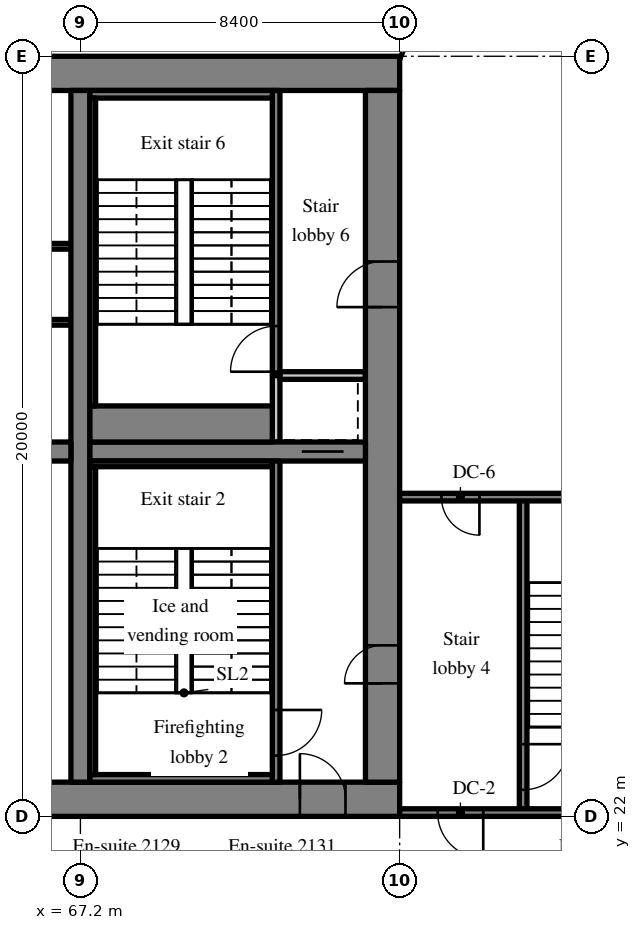
"""IFC4 building model, lengths in metres.
Left out: names, types, materials, properties, quantities, classifications, styles, units other than length and angle.
Written with IfcOpenShell. Run it as: python <this file> out.ifc"""

import sys

from ifc_helpers import new_model, si_unit, direction, frame, frame_2d, origin, place, context, subcontext, project, spatial, rectangle, extrude, source, transform, mapped, element, fill, save


model = new_model("IFC4")
c1 = context("Model", 3, precision=1e-05, world=origin(), true_north=direction((0.0, 1.0)))
c2 = subcontext(c1, "Body", "Model", "MODEL_VIEW")
j1 = project(units=[si_unit("LENGTHUNIT", "METRE"), si_unit("PLANEANGLEUNIT", "RADIAN")], contexts=[c1])
p1 = place(None, origin())
s1 = spatial("IfcSite", under=j1, at=p1, CompositionType="ELEMENT")
p2 = place(p1, origin())
s2 = spatial("IfcBuilding", under=s1, at=p2, CompositionType="ELEMENT")
p3 = place(p2, frame((0.0, 0.0, 91.4)))
s3 = spatial("IfcBuildingStorey", under=s2, at=p3, CompositionType="ELEMENT", Elevation=91.4)
m1 = source(origin(), c2, "Body", "SweptSolid", [
    extrude(rectangle(XDim=50.4, YDim=0.9, at=frame_2d((25.2, 0.0))), origin(), (0.0, 0.0, 1.0), 3.52),
])
p4 = place(p3, frame((25.2, 22.45, 0.0), z_axis=(0.0, 0.0, 1.0), x_axis=(1.0, 0.0, 0.0)))
e1 = element("IfcWall", 1, at=p4, inside=s3, PredefinedType="SHEAR", context=c2, shape_type="MappedRepresentation", body=[
    mapped(m1, transform((0.0, 0.0, 0.0), scale=1.0)),
])
m2 = source(origin(), c2, "Body", "SweptSolid", [
    extrude(rectangle(XDim=1.8, YDim=2.1, at=frame_2d((0.9, 1.05))), frame((0.0, 0.46, 0.0), z_axis=(0.0, -1.0, 0.0), x_axis=(1.0, 0.0, 0.0)), (0.0, 0.0, 1.0), 0.92),
])
p5 = place(p4, frame((15.9, 0.0, 0.0)))
e2 = element("IfcOpeningElement", 2, at=p5, cuts=e1, PredefinedType="OPENING", context=c2, shape_type="MappedRepresentation", body=[
    mapped(m2, transform((0.0, 0.0, 0.0), scale=1.0)),
])
m3 = source(origin(), c2, "Body", "SweptSolid", [
    extrude(rectangle(XDim=1.2, YDim=2.1, at=frame_2d((0.6, 1.05))), frame((0.0, 0.46, 0.0), z_axis=(0.0, -1.0, 0.0), x_axis=(1.0, 0.0, 0.0)), (0.0, 0.0, 1.0), 0.92),
])
p6 = place(p4, frame((26.975, 0.0, 0.0)))
e3 = element("IfcOpeningElement", 3, at=p6, cuts=e1, PredefinedType="OPENING", context=c2, shape_type="MappedRepresentation", body=[
    mapped(m3, transform((0.0, 0.0, 0.0), scale=1.0)),
])
m4 = source(origin(), c2, "Body", "SweptSolid", [
    extrude(rectangle(XDim=0.9, YDim=2.1, at=frame_2d((0.45, 1.05))), frame((0.0, 0.46, 0.0), z_axis=(0.0, -1.0, 0.0), x_axis=(1.0, 0.0, 0.0)), (0.0, 0.0, 1.0), 0.92),
])
p7 = place(p4, frame((34.5, 0.0, 0.0)))
e4 = element("IfcOpeningElement", 4, at=p7, cuts=e1, PredefinedType="OPENING", context=c2, shape_type="MappedRepresentation", body=[
    mapped(m4, transform((0.0, 0.0, 0.0), scale=1.0)),
])
p8 = place(p4, frame((31.5, 0.0, 0.0)))
e5 = element("IfcOpeningElement", 5, at=p8, cuts=e1, PredefinedType="OPENING", context=c2, shape_type="MappedRepresentation", body=[
    mapped(m4, transform((0.0, 0.0, 0.0), scale=1.0)),
])
p9 = place(p4, frame((39.788, 0.0, 0.0)))
e6 = element("IfcOpeningElement", 6, at=p9, cuts=e1, PredefinedType="OPENING", context=c2, shape_type="MappedRepresentation", body=[
    mapped(m4, transform((0.0, 0.0, 0.0), scale=1.0)),
])
p10 = place(p4, frame((36.762, 0.0, 0.0)))
e7 = element("IfcOpeningElement", 7, at=p10, cuts=e1, PredefinedType="OPENING", context=c2, shape_type="MappedRepresentation", body=[
    mapped(m4, transform((0.0, 0.0, 0.0), scale=1.0)),
])
p11 = place(p4, frame((6.45, 0.0, 0.0)))
e8 = element("IfcOpeningElement", 8, at=p11, cuts=e1, PredefinedType="OPENING", context=c2, shape_type="MappedRepresentation", body=[
    mapped(m3, transform((0.0, 0.0, 0.0), scale=1.0)),
])
p12 = place(p4, frame((47.775, 0.0, 0.0)))
e9 = element("IfcOpeningElement", 9, at=p12, cuts=e1, PredefinedType="OPENING", context=c2, shape_type="MappedRepresentation", body=[
    mapped(m3, transform((0.0, 0.0, 0.0), scale=1.0)),
])
p13 = place(p3, frame((25.2, 41.55, 0.0), z_axis=(0.0, 0.0, 1.0), x_axis=(1.0, 0.0, 0.0)))
e10 = element("IfcWall", 10, at=p13, inside=s3, PredefinedType="SHEAR", context=c2, shape_type="MappedRepresentation", body=[
    mapped(m1, transform((0.0, 0.0, 0.0), scale=1.0)),
])
m5 = source(origin(), c2, "Body", "SweptSolid", [
    extrude(rectangle(XDim=18.2, YDim=0.9, at=frame_2d((9.1, 0.0))), origin(), (0.0, 0.0, 1.0), 3.52),
])
p14 = place(p3, frame((75.15, 22.9, 0.0), z_axis=(0.0, 0.0, 1.0), x_axis=(0.0, 1.0, 0.0)))
e11 = element("IfcWall", 11, at=p14, inside=s3, PredefinedType="SHEAR", context=c2, shape_type="MappedRepresentation", body=[
    mapped(m5, transform((0.0, 0.0, 0.0), scale=1.0)),
])
m6 = source(origin(), c2, "Body", "SweptSolid", [
    extrude(rectangle(XDim=1.0, YDim=2.1, at=frame_2d((0.5, 1.05))), frame((0.0, 0.46, 0.0), z_axis=(0.0, -1.0, 0.0), x_axis=(1.0, 0.0, 0.0)), (0.0, 0.0, 1.0), 0.92),
])
p15 = place(p14, frame((2.6, 0.0, 0.0)))
e12 = element("IfcOpeningElement", 12, at=p15, cuts=e11, PredefinedType="OPENING", context=c2, shape_type="MappedRepresentation", body=[
    mapped(m6, transform((0.0, 0.0, 0.0), scale=1.0)),
])
p16 = place(p14, frame((12.5, 0.0, 0.0)))
e13 = element("IfcOpeningElement", 13, at=p16, cuts=e11, PredefinedType="OPENING", context=c2, shape_type="MappedRepresentation", body=[
    mapped(m3, transform((0.0, 0.0, 0.0), scale=1.0)),
])
m7 = source(origin(), c2, "Body", "SweptSolid", [
    extrude(rectangle(XDim=18.2, YDim=0.5, at=frame_2d((9.1, 0.0))), origin(), (0.0, 0.0, 1.0), 3.52),
])
p17 = place(p3, frame((67.2, 22.9, 0.0), z_axis=(0.0, 0.0, 1.0), x_axis=(0.0, 1.0, 0.0)))
e14 = element("IfcWall", 14, at=p17, inside=s3, PredefinedType="SHEAR", context=c2, shape_type="MappedRepresentation", body=[
    mapped(m7, transform((0.0, 0.0, 0.0), scale=1.0)),
])
m8 = source(origin(), c2, "Body", "SweptSolid", [
    extrude(rectangle(XDim=16.3, YDim=0.5, at=frame_2d((8.15, 0.0))), origin(), (0.0, 0.0, 1.0), 3.52),
])
p18 = place(p3, frame((50.65, 31.6, 0.0), z_axis=(0.0, 0.0, 1.0), x_axis=(1.0, 0.0, 0.0)))
e15 = element("IfcWall", 15, at=p18, inside=s3, PredefinedType="SHEAR", context=c2, shape_type="MappedRepresentation", body=[
    mapped(m8, transform((0.0, 0.0, 0.0), scale=1.0)),
])
m9 = source(origin(), c2, "Body", "SweptSolid", [
    extrude(rectangle(XDim=1.0, YDim=2.1, at=frame_2d((0.5, 1.05))), frame((0.0, 0.26, 0.0), z_axis=(0.0, -1.0, 0.0), x_axis=(1.0, 0.0, 0.0)), (0.0, 0.0, 1.0), 0.52),
])
p19 = place(p18, frame((0.575, 0.0, 0.0)))
e16 = element("IfcOpeningElement", 16, at=p19, cuts=e15, PredefinedType="OPENING", context=c2, shape_type="MappedRepresentation", body=[
    mapped(m9, transform((0.0, 0.0, 0.0), scale=1.0)),
])
m10 = source(origin(), c2, "Body", "SweptSolid", [
    extrude(rectangle(XDim=7.25, YDim=0.5, at=frame_2d((3.625, 0.0))), origin(), (0.0, 0.0, 1.0), 3.52),
])
p20 = place(p3, frame((67.45, 31.6, 0.0), z_axis=(0.0, 0.0, 1.0), x_axis=(1.0, 0.0, 0.0)))
e17 = element("IfcWall", 17, at=p20, inside=s3, PredefinedType="SHEAR", context=c2, shape_type="MappedRepresentation", body=[
    mapped(m10, transform((0.0, 0.0, 0.0), scale=1.0)),
])
m11 = source(origin(), c2, "Body", "SweptSolid", [
    extrude(rectangle(XDim=1.1, YDim=2.1, at=frame_2d((0.55, 1.05))), frame((0.0, 0.26, 0.0), z_axis=(0.0, -1.0, 0.0), x_axis=(1.0, 0.0, 0.0)), (0.0, 0.0, 1.0), 0.52),
])
p21 = place(p20, frame((5.575, 0.0, 0.0)))
e18 = element("IfcOpeningElement", 18, at=p21, cuts=e17, PredefinedType="OPENING", context=c2, shape_type="MappedRepresentation", body=[
    mapped(m11, transform((0.0, 0.0, 0.0), scale=1.0)),
])
m12 = source(origin(), c2, "Body", "SweptSolid", [
    extrude(rectangle(XDim=14.15, YDim=0.15, at=frame_2d((7.075, 0.0))), origin(), (0.0, 0.0, 1.0), 3.52),
])
p22 = place(p3, frame((66.95, 35.0, 0.0), z_axis=(0.0, 0.0, 1.0), x_axis=(-1.0, 0.0, 0.0)))
e19 = element("IfcWall", 19, at=p22, inside=s3, PredefinedType="PARTITIONING", context=c2, shape_type="MappedRepresentation", body=[
    mapped(m12, transform((0.0, 0.0, 0.0), scale=1.0)),
])
m13 = source(origin(), c2, "Body", "SweptSolid", [
    extrude(rectangle(XDim=0.9, YDim=2.1, at=frame_2d((0.45, 1.05))), frame((0.0, 0.085, 0.0), z_axis=(0.0, -1.0, 0.0), x_axis=(1.0, 0.0, 0.0)), (0.0, 0.0, 1.0), 0.17),
])
p23 = place(p22, frame((0.958, 0.0, 0.0)))
e20 = element("IfcOpeningElement", 20, at=p23, cuts=e19, PredefinedType="OPENING", context=c2, shape_type="MappedRepresentation", body=[
    mapped(m13, transform((0.0, 0.0, 0.0), scale=1.0)),
])
p24 = place(p22, frame((5.884, 0.0, 0.0)))
e21 = element("IfcOpeningElement", 21, at=p24, cuts=e19, PredefinedType="OPENING", context=c2, shape_type="MappedRepresentation", body=[
    mapped(m13, transform((0.0, 0.0, 0.0), scale=1.0)),
])
p25 = place(p22, frame((11.514, 0.0, 0.0)))
e22 = element("IfcOpeningElement", 22, at=p25, cuts=e19, PredefinedType="OPENING", context=c2, shape_type="MappedRepresentation", body=[
    mapped(m13, transform((0.0, 0.0, 0.0), scale=1.0)),
])
m14 = source(origin(), c2, "Body", "SweptSolid", [
    extrude(rectangle(XDim=16.3, YDim=0.15, at=frame_2d((8.15, 0.0))), origin(), (0.0, 0.0, 1.0), 3.52),
])
p26 = place(p3, frame((66.95, 37.0, 0.0), z_axis=(0.0, 0.0, 1.0), x_axis=(-1.0, 0.0, 0.0)))
e23 = element("IfcWall", 23, at=p26, inside=s3, PredefinedType="PARTITIONING", context=c2, shape_type="MappedRepresentation", body=[
    mapped(m14, transform((0.0, 0.0, 0.0), scale=1.0)),
])
p27 = place(p26, frame((0.773, 0.0, 0.0)))
e24 = element("IfcOpeningElement", 24, at=p27, cuts=e23, PredefinedType="OPENING", context=c2, shape_type="MappedRepresentation", body=[
    mapped(m13, transform((0.0, 0.0, 0.0), scale=1.0)),
])
p28 = place(p26, frame((3.625, 0.0, 0.0)))
e25 = element("IfcOpeningElement", 25, at=p28, cuts=e23, PredefinedType="OPENING", context=c2, shape_type="MappedRepresentation", body=[
    mapped(m13, transform((0.0, 0.0, 0.0), scale=1.0)),
])
p29 = place(p26, frame((9.33, 0.0, 0.0)))
e26 = element("IfcOpeningElement", 26, at=p29, cuts=e23, PredefinedType="OPENING", context=c2, shape_type="MappedRepresentation", body=[
    mapped(m13, transform((0.0, 0.0, 0.0), scale=1.0)),
])
p30 = place(p26, frame((14.627, 0.0, 0.0)))
e27 = element("IfcOpeningElement", 27, at=p30, cuts=e23, PredefinedType="OPENING", context=c2, shape_type="MappedRepresentation", body=[
    mapped(m13, transform((0.0, 0.0, 0.0), scale=1.0)),
])
m15 = source(origin(), c2, "Body", "SweptSolid", [
    extrude(rectangle(XDim=8.45, YDim=0.2, at=frame_2d((4.225, 0.0))), origin(), (0.0, 0.0, 1.0), 3.52),
])
p31 = place(p3, frame((72.35, 22.9, 0.0), z_axis=(0.0, 0.0, 1.0), x_axis=(0.0, 1.0, 0.0)))
e28 = element("IfcWall", 28, at=p31, inside=s3, PredefinedType="SOLIDWALL", context=c2, shape_type="MappedRepresentation", body=[
    mapped(m15, transform((0.0, 0.0, 0.0), scale=1.0)),
])
m16 = source(origin(), c2, "Body", "SweptSolid", [
    extrude(rectangle(XDim=1.2, YDim=2.1, at=frame_2d((0.6, 1.05))), frame((0.0, 0.11, 0.0), z_axis=(0.0, -1.0, 0.0), x_axis=(1.0, 0.0, 0.0)), (0.0, 0.0, 1.0), 0.22),
])
p32 = place(p31, frame((0.7, 0.0, 0.0)))
e29 = element("IfcOpeningElement", 29, at=p32, cuts=e28, PredefinedType="OPENING", context=c2, shape_type="MappedRepresentation", body=[
    mapped(m16, transform((0.0, 0.0, 0.0), scale=1.0)),
])
m17 = source(origin(), c2, "Body", "SweptSolid", [
    extrude(rectangle(XDim=1.75, YDim=0.2, at=frame_2d((0.875, 0.0))), origin(), (0.0, 0.0, 1.0), 3.52),
])
p33 = place(p3, frame((72.35, 31.85, 0.0), z_axis=(0.0, 0.0, 1.0), x_axis=(0.0, 1.0, 0.0)))
e30 = element("IfcWall", 30, at=p33, inside=s3, PredefinedType="SOLIDWALL", context=c2, shape_type="MappedRepresentation", body=[
    mapped(m17, transform((0.0, 0.0, 0.0), scale=1.0)),
])
m18 = source(origin(), c2, "Body", "SweptSolid", [
    extrude(rectangle(XDim=2.25, YDim=0.2, at=frame_2d((1.125, 0.0))), origin(), (0.0, 0.0, 1.0), 3.52),
])
p34 = place(p3, frame((72.45, 33.6, 0.0), z_axis=(0.0, 0.0, 1.0), x_axis=(1.0, 0.0, 0.0)))
e31 = element("IfcWall", 31, at=p34, inside=s3, PredefinedType="SOLIDWALL", context=c2, shape_type="MappedRepresentation", body=[
    mapped(m18, transform((0.0, 0.0, 0.0), scale=1.0)),
])
m19 = source(origin(), c2, "Body", "SweptSolid", [
    extrude(rectangle(XDim=7.5, YDim=0.2, at=frame_2d((3.75, 0.0))), origin(), (0.0, 0.0, 1.0), 3.52),
])
p35 = place(p3, frame((72.35, 33.6, 0.0), z_axis=(0.0, 0.0, 1.0), x_axis=(0.0, 1.0, 0.0)))
e32 = element("IfcWall", 32, at=p35, inside=s3, PredefinedType="SOLIDWALL", context=c2, shape_type="MappedRepresentation", body=[
    mapped(m19, transform((0.0, 0.0, 0.0), scale=1.0)),
])
p36 = place(p35, frame((0.1, 0.0, 0.0)))
e33 = element("IfcOpeningElement", 33, at=p36, cuts=e32, PredefinedType="OPENING", context=c2, shape_type="MappedRepresentation", body=[
    mapped(m16, transform((0.0, 0.0, 0.0), scale=1.0)),
])
m20 = source(origin(), c2, "Body", "SweptSolid", [
    extrude(rectangle(XDim=8.3, YDim=0.2, at=frame_2d((4.15, 0.0))), origin(), (0.0, 0.0, 1.0), 3.52),
])
p37 = place(p3, frame((78.85, 22.1, 0.0), z_axis=(0.0, 0.0, 1.0), x_axis=(0.0, 1.0, 0.0)))
e34 = element("IfcWall", 34, at=p37, inside=s3, PredefinedType="SOLIDWALL", context=c2, shape_type="MappedRepresentation", body=[
    mapped(m20, transform((0.0, 0.0, 0.0), scale=1.0)),
])
p38 = place(p37, frame((0.6, 0.0, 0.0)))
e35 = element("IfcOpeningElement", 35, at=p38, cuts=e34, PredefinedType="OPENING", context=c2, shape_type="MappedRepresentation", body=[
    mapped(m16, transform((0.0, 0.0, 0.0), scale=1.0)),
])
m21 = source(origin(), c2, "Body", "SweptSolid", [
    extrude(rectangle(XDim=8.225, YDim=0.2, at=frame_2d((4.112, 0.0))), origin(), (0.0, 0.0, 1.0), 3.52),
])
p39 = place(p3, frame((83.825, 22.1, 0.0), z_axis=(0.0, 0.0, 1.0), x_axis=(-1.0, 0.0, 0.0)))
e36 = element("IfcWall", 36, at=p39, inside=s3, PredefinedType="SOLIDWALL", context=c2, shape_type="MappedRepresentation", body=[
    mapped(m21, transform((0.0, 0.0, 0.0), scale=1.0)),
])
p40 = place(p39, frame((6.025, 0.0, 0.0)))
e37 = element("IfcOpeningElement", 37, at=p40, cuts=e36, PredefinedType="OPENING", context=c2, shape_type="MappedRepresentation", body=[
    mapped(m16, transform((0.0, 0.0, 0.0), scale=1.0)),
])
p41 = place(p3, frame((83.825, 30.4, 0.0), z_axis=(0.0, 0.0, 1.0), x_axis=(-1.0, 0.0, 0.0)))
e38 = element("IfcWall", 38, at=p41, inside=s3, PredefinedType="SOLIDWALL", context=c2, shape_type="MappedRepresentation", body=[
    mapped(m21, transform((0.0, 0.0, 0.0), scale=1.0)),
])
m22 = source(origin(), c2, "Body", "SweptSolid", [
    extrude(rectangle(XDim=1.0, YDim=2.1, at=frame_2d((0.5, 1.05))), frame((0.0, 0.11, 0.0), z_axis=(0.0, -1.0, 0.0), x_axis=(1.0, 0.0, 0.0)), (0.0, 0.0, 1.0), 0.22),
])
p42 = place(p41, frame((6.125, 0.0, 0.0)))
e39 = element("IfcOpeningElement", 39, at=p42, cuts=e38, PredefinedType="OPENING", context=c2, shape_type="MappedRepresentation", body=[
    mapped(m22, transform((0.0, 0.0, 0.0), scale=1.0)),
])
m23 = source(origin(), c2, "Body", "SweptSolid", [
    extrude(rectangle(XDim=4.8, YDim=0.2, at=frame_2d((2.4, 0.0))), origin(), (0.0, 0.0, 1.0), 3.52),
])
p43 = place(p3, frame((67.45, 23.0, 0.0), z_axis=(0.0, 0.0, 1.0), x_axis=(1.0, 0.0, 0.0)))
e40 = element("IfcWall", 40, at=p43, inside=s3, PredefinedType="SOLIDWALL", context=c2, shape_type="MappedRepresentation", body=[
    mapped(m23, transform((0.0, 0.0, 0.0), scale=1.0)),
])
m24 = source(origin(), c2, "Body", "SweptSolid", [
    extrude(rectangle(XDim=4.8, YDim=0.15, at=frame_2d((2.4, 0.0))), origin(), (0.0, 0.0, 1.0), 3.52),
])
p44 = place(p3, frame((67.45, 31.275, 0.0), z_axis=(0.0, 0.0, 1.0), x_axis=(1.0, 0.0, 0.0)))
e41 = element("IfcWall", 41, at=p44, inside=s3, PredefinedType="SOLIDWALL", context=c2, shape_type="MappedRepresentation", body=[
    mapped(m24, transform((0.0, 0.0, 0.0), scale=1.0)),
])
m25 = source(origin(), c2, "Body", "SweptSolid", [
    extrude(rectangle(XDim=8.1, YDim=0.15, at=frame_2d((4.05, 0.0))), origin(), (0.0, 0.0, 1.0), 3.52),
])
p45 = place(p3, frame((67.525, 23.1, 0.0), z_axis=(0.0, 0.0, 1.0), x_axis=(0.0, 1.0, 0.0)))
e42 = element("IfcWall", 42, at=p45, inside=s3, PredefinedType="SOLIDWALL", context=c2, shape_type="MappedRepresentation", body=[
    mapped(m25, transform((0.0, 0.0, 0.0), scale=1.0)),
])
p46 = place(p3, frame((67.45, 41.0, 0.0), z_axis=(0.0, 0.0, 1.0), x_axis=(1.0, 0.0, 0.0)))
e43 = element("IfcWall", 43, at=p46, inside=s3, PredefinedType="SOLIDWALL", context=c2, shape_type="MappedRepresentation", body=[
    mapped(m23, transform((0.0, 0.0, 0.0), scale=1.0)),
])
m26 = source(origin(), c2, "Body", "SweptSolid", [
    extrude(rectangle(XDim=4.8, YDim=0.95, at=frame_2d((2.4, 0.0))), origin(), (0.0, 0.0, 1.0), 3.52),
])
p47 = place(p3, frame((67.45, 32.325, 0.0), z_axis=(0.0, 0.0, 1.0), x_axis=(1.0, 0.0, 0.0)))
e44 = element("IfcWall", 44, at=p47, inside=s3, PredefinedType="SOLIDWALL", context=c2, shape_type="MappedRepresentation", body=[
    mapped(m26, transform((0.0, 0.0, 0.0), scale=1.0)),
])
p48 = place(p3, frame((67.525, 32.8, 0.0), z_axis=(0.0, 0.0, 1.0), x_axis=(0.0, 1.0, 0.0)))
e45 = element("IfcWall", 45, at=p48, inside=s3, PredefinedType="SOLIDWALL", context=c2, shape_type="MappedRepresentation", body=[
    mapped(m25, transform((0.0, 0.0, 0.0), scale=1.0)),
])
m27 = source(origin(), c2, "Body", "SweptSolid", [
    extrude(rectangle(XDim=1.2, YDim=2.1, at=frame_2d((0.6, 1.05))), frame((0.0, 0.025, 0.0), z_axis=(0.0, -1.0, 0.0), x_axis=(1.0, 0.0, 0.0)), (0.0, 0.0, 1.0), 0.05),
])
p49 = place(p32, origin())
e46 = element("IfcDoor", 46, at=p49, inside=s3, OperationType="SINGLE_SWING_RIGHT", PredefinedType="DOOR", context=c2, shape_type="MappedRepresentation", body=[
    mapped(m27, transform((0.0, 0.0, 0.0), scale=1.0)),
])
fill(e29, e46)
m28 = source(origin(), c2, "Body", "SweptSolid", [
    extrude(rectangle(XDim=1.2, YDim=2.1, at=frame_2d((0.6, 1.05))), frame((0.0, 0.375, 0.0), z_axis=(0.0, -1.0, 0.0), x_axis=(1.0, 0.0, 0.0)), (0.0, 0.0, 1.0), 0.05),
])
p50 = place(p12, origin())
e47 = element("IfcDoor", 47, at=p50, inside=s3, OperationType="SINGLE_SWING_LEFT", PredefinedType="DOOR", context=c2, shape_type="MappedRepresentation", body=[
    mapped(m28, transform((0.0, 0.0, 0.0), scale=1.0)),
])
fill(e9, e47)
m29 = source(origin(), c2, "Body", "SweptSolid", [
    extrude(rectangle(XDim=1.1, YDim=2.1, at=frame_2d((0.55, 1.05))), frame((0.0, 0.025, 0.0), z_axis=(0.0, -1.0, 0.0), x_axis=(1.0, 0.0, 0.0)), (0.0, 0.0, 1.0), 0.05),
])
p51 = place(p21, origin())
e48 = element("IfcDoor", 48, at=p51, inside=s3, OperationType="SLIDING_TO_RIGHT", PredefinedType="DOOR", context=c2, shape_type="MappedRepresentation", body=[
    mapped(m29, transform((0.0, 0.0, 0.0), scale=1.0)),
])
fill(e18, e48)
m30 = source(origin(), c2, "Body", "SweptSolid", [
    extrude(rectangle(XDim=1.0, YDim=2.1, at=frame_2d((0.5, 1.05))), frame((0.0, 0.025, 0.0), z_axis=(0.0, -1.0, 0.0), x_axis=(1.0, 0.0, 0.0)), (0.0, 0.0, 1.0), 0.05),
])
p52 = place(p15, origin())
e49 = element("IfcDoor", 49, at=p52, inside=s3, OperationType="SINGLE_SWING_LEFT", PredefinedType="DOOR", context=c2, shape_type="MappedRepresentation", body=[
    mapped(m30, transform((0.0, 0.0, 0.0), scale=1.0)),
])
fill(e12, e49)
p53 = place(p36, origin())
e50 = element("IfcDoor", 50, at=p53, inside=s3, OperationType="SINGLE_SWING_LEFT", PredefinedType="DOOR", context=c2, shape_type="MappedRepresentation", body=[
    mapped(m27, transform((0.0, 0.0, 0.0), scale=1.0)),
])
fill(e33, e50)
p54 = place(p16, origin())
e51 = element("IfcDoor", 51, at=p54, inside=s3, OperationType="SINGLE_SWING_LEFT", PredefinedType="DOOR", context=c2, shape_type="MappedRepresentation", body=[
    mapped(m27, transform((0.0, 0.0, 0.0), scale=1.0)),
])
fill(e13, e51)
p55 = place(p38, origin())
e52 = element("IfcDoor", 52, at=p55, inside=s3, OperationType="SINGLE_SWING_RIGHT", PredefinedType="DOOR", context=c2, shape_type="MappedRepresentation", body=[
    mapped(m27, transform((0.0, 0.0, 0.0), scale=1.0)),
])
fill(e35, e52)
p56 = place(p40, origin())
e53 = element("IfcDoor", 53, at=p56, inside=s3, OperationType="SINGLE_SWING_LEFT", PredefinedType="DOOR", context=c2, shape_type="MappedRepresentation", body=[
    mapped(m27, transform((0.0, 0.0, 0.0), scale=1.0)),
])
fill(e37, e53)
p57 = place(p42, origin())
e54 = element("IfcDoor", 54, at=p57, inside=s3, OperationType="SINGLE_SWING_LEFT", PredefinedType="DOOR", context=c2, shape_type="MappedRepresentation", body=[
    mapped(m30, transform((0.0, 0.0, 0.0), scale=1.0)),
])
fill(e39, e54)
save(model, sys.argv[1])
